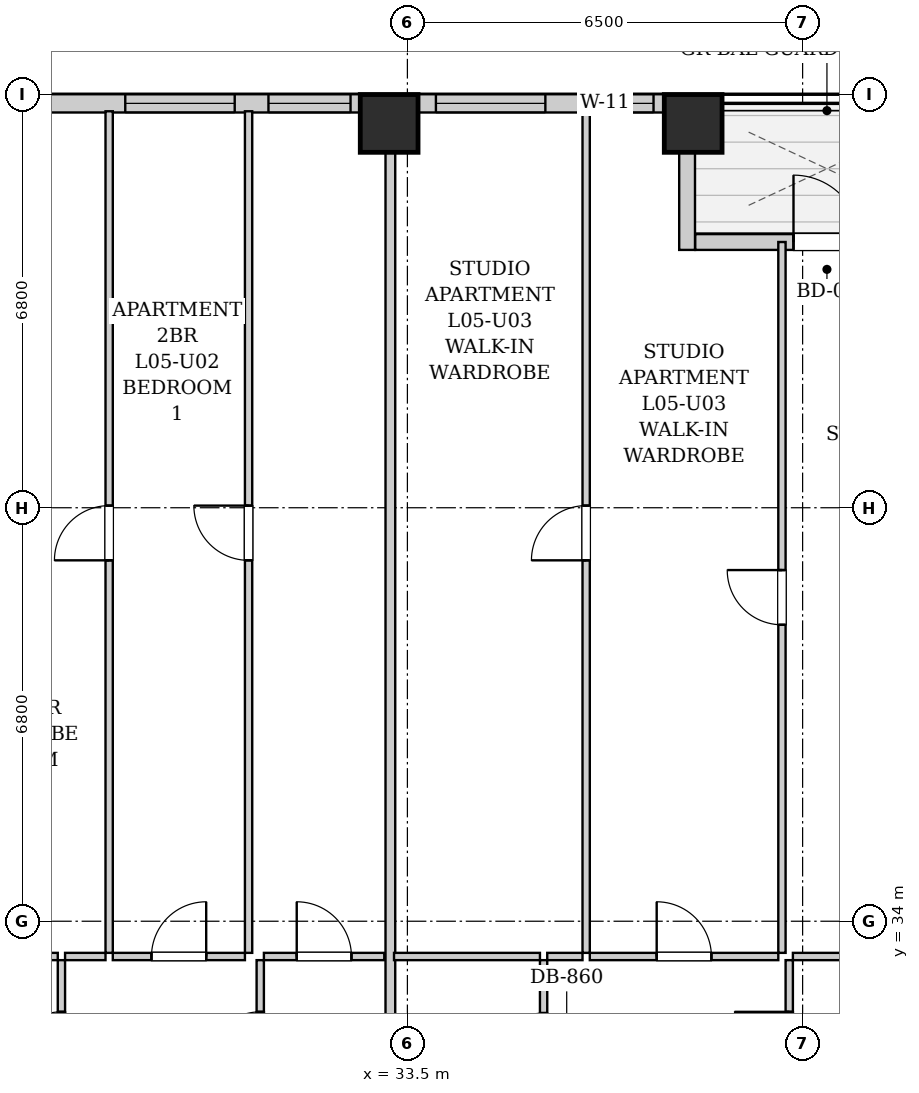
"""IFC4 building model, lengths in metres.
Left out: names, types, materials, properties, quantities, classifications, styles, units other than length and angle.
Written with IfcOpenShell. Run it as: python <this file> out.ifc"""

import sys

from ifc_helpers import new_model, si_unit, direction, frame, frame_2d, origin, origin_2d, place, context, subcontext, project, spatial, rectangle, extrude, element, fill, save


model = new_model("IFC4")
c1 = context("Model", 3, precision=1e-05, world=origin(), true_north=direction((0.0, 1.0)))
c2 = subcontext(c1, "Body", "Model", "MODEL_VIEW")
j1 = project(units=[si_unit("LENGTHUNIT", "METRE"), si_unit("PLANEANGLEUNIT", "RADIAN")], contexts=[c1])
p1 = place(None, origin())
s1 = spatial("IfcSite", under=j1, at=p1, CompositionType="ELEMENT")
p2 = place(p1, origin())
s2 = spatial("IfcBuilding", under=s1, at=p2, CompositionType="ELEMENT")
p3 = place(p2, frame((0.0, 0.0, 25.8)))
s3 = spatial("IfcBuildingStorey", under=s2, at=p3, CompositionType="ELEMENT", Elevation=25.8)
for number, where, z_axis, x_axis in (
    (1, (33.2, 47.12, 0.0), (0.0, 0.0, 1.0), (1.0, 0.0, 0.0)),
    (2, (38.2, 47.12, 0.0), (0.0, 0.0, 1.0), (1.0, 0.0, 0.0)),
):
    element("IfcColumn", number, at=place(p3, frame(where, z_axis=z_axis, x_axis=x_axis)), inside=s3, PredefinedType="COLUMN", context=c2, shape_type="SweptSolid", body=[
        extrude(rectangle(XDim=0.95, YDim=0.95, at=origin_2d()), origin(), (0.0, 0.0, 1.0), 3.2),
    ])
p4 = place(p3, frame((10.0, 47.45, 0.0), z_axis=(0.0, 0.0, 1.0), x_axis=(1.0, 0.0, 0.0)))
e3 = element("IfcWall", 3, at=p4, inside=s3, PredefinedType="SOLIDWALL", context=c2, shape_type="SweptSolid", body=[
    extrude(rectangle(XDim=28.1, YDim=0.3, at=frame_2d((14.05, 0.0))), origin(), (0.0, 0.0, 1.0), 1.975),
])
p5 = place(p4, frame((5.712, 0.0, 0.55)))
e4 = element("IfcOpeningElement", 4, at=p5, cuts=e3, PredefinedType="OPENING", context=c2, shape_type="SweptSolid", body=[
    extrude(rectangle(XDim=1.35, YDim=1.2, at=frame_2d((0.675, 0.6))), frame((0.0, 0.16, 0.0), z_axis=(0.0, -1.0, 0.0), x_axis=(1.0, 0.0, 0.0)), (0.0, 0.0, 1.0), 0.32),
])
p6 = place(p4, frame((8.792, 0.0, 0.55)))
e5 = element("IfcOpeningElement", 5, at=p6, cuts=e3, PredefinedType="OPENING", context=c2, shape_type="SweptSolid", body=[
    extrude(rectangle(XDim=1.8, YDim=1.2, at=frame_2d((0.9, 0.6))), frame((0.0, 0.16, 0.0), z_axis=(0.0, -1.0, 0.0), x_axis=(1.0, 0.0, 0.0)), (0.0, 0.0, 1.0), 0.32),
])
p7 = place(p4, frame((18.86, 0.0, 0.55)))
e6 = element("IfcOpeningElement", 6, at=p7, cuts=e3, PredefinedType="OPENING", context=c2, shape_type="SweptSolid", body=[
    extrude(rectangle(XDim=1.8, YDim=1.2, at=frame_2d((0.9, 0.6))), frame((0.0, 0.16, 0.0), z_axis=(0.0, -1.0, 0.0), x_axis=(1.0, 0.0, 0.0)), (0.0, 0.0, 1.0), 0.32),
])
p8 = place(p4, frame((21.215, 0.0, 0.55)))
e7 = element("IfcOpeningElement", 7, at=p8, cuts=e3, PredefinedType="OPENING", context=c2, shape_type="SweptSolid", body=[
    extrude(rectangle(XDim=1.35, YDim=1.2, at=frame_2d((0.675, 0.6))), frame((0.0, 0.16, 0.0), z_axis=(0.0, -1.0, 0.0), x_axis=(1.0, 0.0, 0.0)), (0.0, 0.0, 1.0), 0.32),
])
p9 = place(p4, frame((23.969, 0.0, 0.55)))
e8 = element("IfcOpeningElement", 8, at=p9, cuts=e3, PredefinedType="OPENING", context=c2, shape_type="SweptSolid", body=[
    extrude(rectangle(XDim=1.8, YDim=1.2, at=frame_2d((0.9, 0.6))), frame((0.0, 0.16, 0.0), z_axis=(0.0, -1.0, 0.0), x_axis=(1.0, 0.0, 0.0)), (0.0, 0.0, 1.0), 0.32),
])
p10 = place(p4, frame((26.698, 0.0, 0.55)))
e9 = element("IfcOpeningElement", 9, at=p10, cuts=e3, PredefinedType="OPENING", context=c2, shape_type="SweptSolid", body=[
    extrude(rectangle(XDim=0.85, YDim=1.2, at=frame_2d((0.425, 0.6))), frame((0.0, 0.16, 0.0), z_axis=(0.0, -1.0, 0.0), x_axis=(1.0, 0.0, 0.0)), (0.0, 0.0, 1.0), 0.32),
])
p11 = place(p3, frame((38.1, 47.44, 0.0), z_axis=(0.0, 0.0, 1.0), x_axis=(0.0, -1.0, 0.0)))
e10 = element("IfcWall", 10, at=p11, inside=s3, PredefinedType="SOLIDWALL", context=c2, shape_type="SweptSolid", body=[
    extrude(rectangle(XDim=2.4, YDim=0.26, at=frame_2d((1.2, 0.0))), origin(), (0.0, 0.0, 1.0), 2.94),
])
p12 = place(p3, frame((38.234, 45.17, 0.0), z_axis=(0.0, 0.0, 1.0), x_axis=(1.0, 0.0, 0.0)))
e11 = element("IfcWall", 11, at=p12, inside=s3, PredefinedType="SOLIDWALL", context=c2, shape_type="SweptSolid", body=[
    extrude(rectangle(XDim=4.332, YDim=0.26, at=frame_2d((2.166, 0.0))), origin(), (0.0, 0.0, 1.0), 2.94),
])
p13 = place(p12, frame((1.616, 0.0, 0.0)))
e12 = element("IfcOpeningElement", 12, at=p13, cuts=e11, PredefinedType="OPENING", context=c2, shape_type="SweptSolid", body=[
    extrude(rectangle(XDim=1.1, YDim=2.0, at=frame_2d((0.55, 1.0))), frame((0.0, 0.14, 0.0), z_axis=(0.0, -1.0, 0.0), x_axis=(1.0, 0.0, 0.0)), (0.0, 0.0, 1.0), 0.28),
])
p14 = place(p3, frame((27.81, 30.76, 0.0), z_axis=(0.0, 0.0, 1.0), x_axis=(0.0, 1.0, 0.0)))
e13 = element("IfcWall", 13, at=p14, inside=s3, PredefinedType="PARTITIONING", context=c2, shape_type="SweptSolid", body=[
    extrude(rectangle(XDim=2.6, YDim=0.12, at=frame_2d((1.3, 0.0))), origin(), (0.0, 0.0, 1.0), 2.94),
])
p15 = place(p14, frame((0.85, 0.0, 0.0)))
e14 = element("IfcOpeningElement", 14, at=p15, cuts=e13, PredefinedType="OPENING", context=c2, shape_type="SweptSolid", body=[
    extrude(rectangle(XDim=0.9, YDim=2.05, at=frame_2d((0.45, 1.025))), frame((0.0, 0.07, 0.0), z_axis=(0.0, -1.0, 0.0), x_axis=(1.0, 0.0, 0.0)), (0.0, 0.0, 1.0), 0.14),
])
p16 = place(p3, frame((24.204, 33.42, 0.0), z_axis=(0.0, 0.0, 1.0), x_axis=(1.0, 0.0, 0.0)))
e15 = element("IfcWall", 15, at=p16, inside=s3, PredefinedType="PARTITIONING", context=c2, shape_type="SweptSolid", body=[
    extrude(rectangle(XDim=3.546, YDim=0.12, at=frame_2d((1.773, 0.0))), origin(), (0.0, 0.0, 1.0), 2.94),
])
p17 = place(p16, frame((1.323, 0.0, 0.0)))
e16 = element("IfcOpeningElement", 16, at=p17, cuts=e15, PredefinedType="OPENING", context=c2, shape_type="SweptSolid", body=[
    extrude(rectangle(XDim=0.9, YDim=2.05, at=frame_2d((0.45, 1.025))), frame((0.0, 0.07, 0.0), z_axis=(0.0, -1.0, 0.0), x_axis=(1.0, 0.0, 0.0)), (0.0, 0.0, 1.0), 0.14),
])
p18 = place(p3, frame((31.08, 30.76, 0.0), z_axis=(0.0, 0.0, 1.0), x_axis=(0.0, 1.0, 0.0)))
e17 = element("IfcWall", 17, at=p18, inside=s3, PredefinedType="PARTITIONING", context=c2, shape_type="SweptSolid", body=[
    extrude(rectangle(XDim=2.6, YDim=0.12, at=frame_2d((1.3, 0.0))), origin(), (0.0, 0.0, 1.0), 2.94),
])
p19 = place(p18, frame((0.85, 0.0, 0.0)))
e18 = element("IfcOpeningElement", 18, at=p19, cuts=e17, PredefinedType="OPENING", context=c2, shape_type="SweptSolid", body=[
    extrude(rectangle(XDim=0.9, YDim=2.05, at=frame_2d((0.45, 1.025))), frame((0.0, 0.07, 0.0), z_axis=(0.0, -1.0, 0.0), x_axis=(1.0, 0.0, 0.0)), (0.0, 0.0, 1.0), 0.14),
])
p20 = place(p3, frame((27.87, 33.42, 0.0), z_axis=(0.0, 0.0, 1.0), x_axis=(1.0, 0.0, 0.0)))
e19 = element("IfcWall", 19, at=p20, inside=s3, PredefinedType="PARTITIONING", context=c2, shape_type="SweptSolid", body=[
    extrude(rectangle(XDim=0.665, YDim=0.12, at=frame_2d((0.333, 0.0))), origin(), (0.0, 0.0, 1.0), 2.94),
])
p21 = place(p3, frame((28.655, 33.42, 0.0), z_axis=(0.0, 0.0, 1.0), x_axis=(1.0, 0.0, 0.0)))
e20 = element("IfcWall", 20, at=p21, inside=s3, PredefinedType="PARTITIONING", context=c2, shape_type="SweptSolid", body=[
    extrude(rectangle(XDim=2.173, YDim=0.12, at=frame_2d((1.086, 0.0))), origin(), (0.0, 0.0, 1.0), 2.94),
])
p22 = place(p21, frame((0.636, 0.0, 0.0)))
e21 = element("IfcOpeningElement", 21, at=p22, cuts=e20, PredefinedType="OPENING", context=c2, shape_type="SweptSolid", body=[
    extrude(rectangle(XDim=0.9, YDim=2.05, at=frame_2d((0.45, 1.025))), frame((0.0, 0.07, 0.0), z_axis=(0.0, -1.0, 0.0), x_axis=(1.0, 0.0, 0.0)), (0.0, 0.0, 1.0), 0.14),
])
p23 = place(p3, frame((31.14, 33.42, 0.0), z_axis=(0.0, 0.0, 1.0), x_axis=(1.0, 0.0, 0.0)))
e22 = element("IfcWall", 22, at=p23, inside=s3, PredefinedType="PARTITIONING", context=c2, shape_type="SweptSolid", body=[
    extrude(rectangle(XDim=1.98, YDim=0.12, at=frame_2d((0.99, 0.0))), origin(), (0.0, 0.0, 1.0), 2.94),
])
p24 = place(p23, frame((0.54, 0.0, 0.0)))
e23 = element("IfcOpeningElement", 23, at=p24, cuts=e22, PredefinedType="OPENING", context=c2, shape_type="SweptSolid", body=[
    extrude(rectangle(XDim=0.9, YDim=2.05, at=frame_2d((0.45, 1.025))), frame((0.0, 0.07, 0.0), z_axis=(0.0, -1.0, 0.0), x_axis=(1.0, 0.0, 0.0)), (0.0, 0.0, 1.0), 0.14),
])
p25 = place(p3, frame((28.595, 33.48, 0.0), z_axis=(0.0, 0.0, 1.0), x_axis=(0.0, 1.0, 0.0)))
e24 = element("IfcWall", 24, at=p25, inside=s3, PredefinedType="PARTITIONING", context=c2, shape_type="SweptSolid", body=[
    extrude(rectangle(XDim=13.84, YDim=0.12, at=frame_2d((6.92, 0.0))), origin(), (0.0, 0.0, 1.0), 2.94),
])
p26 = place(p25, frame((6.455, 0.0, 0.0)))
e25 = element("IfcOpeningElement", 25, at=p26, cuts=e24, PredefinedType="OPENING", context=c2, shape_type="SweptSolid", body=[
    extrude(rectangle(XDim=0.9, YDim=2.05, at=frame_2d((0.45, 1.025))), frame((0.0, 0.07, 0.0), z_axis=(0.0, -1.0, 0.0), x_axis=(1.0, 0.0, 0.0)), (0.0, 0.0, 1.0), 0.14),
])
p27 = place(p3, frame((30.888, 33.48, 0.0), z_axis=(0.0, 0.0, 1.0), x_axis=(0.0, 1.0, 0.0)))
e26 = element("IfcWall", 26, at=p27, inside=s3, PredefinedType="PARTITIONING", context=c2, shape_type="SweptSolid", body=[
    extrude(rectangle(XDim=13.84, YDim=0.12, at=frame_2d((6.92, 0.0))), origin(), (0.0, 0.0, 1.0), 2.94),
])
p28 = place(p27, frame((6.455, 0.0, 0.0)))
e27 = element("IfcOpeningElement", 27, at=p28, cuts=e26, PredefinedType="OPENING", context=c2, shape_type="SweptSolid", body=[
    extrude(rectangle(XDim=0.9, YDim=2.05, at=frame_2d((0.45, 1.025))), frame((0.0, 0.07, 0.0), z_axis=(0.0, -1.0, 0.0), x_axis=(1.0, 0.0, 0.0)), (0.0, 0.0, 1.0), 0.14),
])
p29 = place(p3, frame((33.22, 30.76, 0.0), z_axis=(0.0, 0.0, 1.0), x_axis=(0.0, 1.0, 0.0)))
e28 = element("IfcWall", 28, at=p29, inside=s3, PredefinedType="PARTITIONING", context=c2, shape_type="SweptSolid", body=[
    extrude(rectangle(XDim=16.56, YDim=0.16, at=frame_2d((8.28, 0.0))), origin(), (0.0, 0.0, 1.0), 2.155),
])
p30 = place(p3, frame((35.74, 30.76, 0.0), z_axis=(0.0, 0.0, 1.0), x_axis=(0.0, 1.0, 0.0)))
e29 = element("IfcWall", 29, at=p30, inside=s3, PredefinedType="PARTITIONING", context=c2, shape_type="SweptSolid", body=[
    extrude(rectangle(XDim=2.6, YDim=0.12, at=frame_2d((1.3, 0.0))), origin(), (0.0, 0.0, 1.0), 2.94),
])
p31 = place(p30, frame((0.87, 0.0, 0.0)))
e30 = element("IfcOpeningElement", 30, at=p31, cuts=e29, PredefinedType="OPENING", context=c2, shape_type="SweptSolid", body=[
    extrude(rectangle(XDim=0.86, YDim=2.05, at=frame_2d((0.43, 1.025))), frame((0.0, 0.07, 0.0), z_axis=(0.0, -1.0, 0.0), x_axis=(1.0, 0.0, 0.0)), (0.0, 0.0, 1.0), 0.14),
])
p32 = place(p3, frame((33.28, 33.42, 0.0), z_axis=(0.0, 0.0, 1.0), x_axis=(1.0, 0.0, 0.0)))
e31 = element("IfcWall", 31, at=p32, inside=s3, PredefinedType="PARTITIONING", context=c2, shape_type="SweptSolid", body=[
    extrude(rectangle(XDim=2.4, YDim=0.12, at=frame_2d((1.2, 0.0))), origin(), (0.0, 0.0, 1.0), 2.94),
])
p33 = place(p3, frame((39.78, 30.76, 0.0), z_axis=(0.0, 0.0, 1.0), x_axis=(0.0, 1.0, 0.0)))
e32 = element("IfcWall", 32, at=p33, inside=s3, PredefinedType="PARTITIONING", context=c2, shape_type="SweptSolid", body=[
    extrude(rectangle(XDim=2.6, YDim=0.12, at=frame_2d((1.3, 0.0))), origin(), (0.0, 0.0, 1.0), 2.94),
])
p34 = place(p33, frame((0.85, 0.0, 0.0)))
e33 = element("IfcOpeningElement", 33, at=p34, cuts=e32, PredefinedType="OPENING", context=c2, shape_type="SweptSolid", body=[
    extrude(rectangle(XDim=0.9, YDim=2.05, at=frame_2d((0.45, 1.025))), frame((0.0, 0.07, 0.0), z_axis=(0.0, -1.0, 0.0), x_axis=(1.0, 0.0, 0.0)), (0.0, 0.0, 1.0), 0.14),
])
p35 = place(p3, frame((35.8, 33.42, 0.0), z_axis=(0.0, 0.0, 1.0), x_axis=(1.0, 0.0, 0.0)))
e34 = element("IfcWall", 34, at=p35, inside=s3, PredefinedType="PARTITIONING", context=c2, shape_type="SweptSolid", body=[
    extrude(rectangle(XDim=0.58, YDim=0.12, at=frame_2d((0.29, 0.0))), origin(), (0.0, 0.0, 1.0), 2.94),
])
p36 = place(p3, frame((36.5, 33.42, 0.0), z_axis=(0.0, 0.0, 1.0), x_axis=(1.0, 0.0, 0.0)))
e35 = element("IfcWall", 35, at=p36, inside=s3, PredefinedType="PARTITIONING", context=c2, shape_type="SweptSolid", body=[
    extrude(rectangle(XDim=3.1, YDim=0.12, at=frame_2d((1.55, 0.0))), origin(), (0.0, 0.0, 1.0), 2.94),
])
p37 = place(p36, frame((1.1, 0.0, 0.0)))
e36 = element("IfcOpeningElement", 36, at=p37, cuts=e35, PredefinedType="OPENING", context=c2, shape_type="SweptSolid", body=[
    extrude(rectangle(XDim=0.9, YDim=2.05, at=frame_2d((0.45, 1.025))), frame((0.0, 0.07, 0.0), z_axis=(0.0, -1.0, 0.0), x_axis=(1.0, 0.0, 0.0)), (0.0, 0.0, 1.0), 0.14),
])
p38 = place(p3, frame((39.84, 33.42, 0.0), z_axis=(0.0, 0.0, 1.0), x_axis=(1.0, 0.0, 0.0)))
e37 = element("IfcWall", 37, at=p38, inside=s3, PredefinedType="PARTITIONING", context=c2, shape_type="SweptSolid", body=[
    extrude(rectangle(XDim=4.08, YDim=0.12, at=frame_2d((2.04, 0.0))), origin(), (0.0, 0.0, 1.0), 2.94),
])
p39 = place(p38, frame((1.59, 0.0, 0.0)))
e38 = element("IfcOpeningElement", 38, at=p39, cuts=e37, PredefinedType="OPENING", context=c2, shape_type="SweptSolid", body=[
    extrude(rectangle(XDim=0.9, YDim=2.05, at=frame_2d((0.45, 1.025))), frame((0.0, 0.07, 0.0), z_axis=(0.0, -1.0, 0.0), x_axis=(1.0, 0.0, 0.0)), (0.0, 0.0, 1.0), 0.14),
])
p40 = place(p3, frame((36.44, 33.48, 0.0), z_axis=(0.0, 0.0, 1.0), x_axis=(0.0, 1.0, 0.0)))
e39 = element("IfcWall", 39, at=p40, inside=s3, PredefinedType="PARTITIONING", context=c2, shape_type="SweptSolid", body=[
    extrude(rectangle(XDim=13.84, YDim=0.12, at=frame_2d((6.92, 0.0))), origin(), (0.0, 0.0, 1.0), 2.94),
])
p41 = place(p40, frame((6.455, 0.0, 0.0)))
e40 = element("IfcOpeningElement", 40, at=p41, cuts=e39, PredefinedType="OPENING", context=c2, shape_type="SweptSolid", body=[
    extrude(rectangle(XDim=0.9, YDim=2.05, at=frame_2d((0.45, 1.025))), frame((0.0, 0.07, 0.0), z_axis=(0.0, -1.0, 0.0), x_axis=(1.0, 0.0, 0.0)), (0.0, 0.0, 1.0), 0.14),
])
p42 = place(p3, frame((39.66, 33.48, 0.0), z_axis=(0.0, 0.0, 1.0), x_axis=(0.0, 1.0, 0.0)))
e41 = element("IfcWall", 41, at=p42, inside=s3, PredefinedType="PARTITIONING", context=c2, shape_type="SweptSolid", body=[
    extrude(rectangle(XDim=11.69, YDim=0.12, at=frame_2d((5.845, 0.0))), origin(), (0.0, 0.0, 1.0), 2.94),
])
p43 = place(p42, frame((5.395, 0.0, 0.0)))
e42 = element("IfcOpeningElement", 42, at=p43, cuts=e41, PredefinedType="OPENING", context=c2, shape_type="SweptSolid", body=[
    extrude(rectangle(XDim=0.9, YDim=2.05, at=frame_2d((0.45, 1.025))), frame((0.0, 0.07, 0.0), z_axis=(0.0, -1.0, 0.0), x_axis=(1.0, 0.0, 0.0)), (0.0, 0.0, 1.0), 0.14),
])
p44 = place(p15, origin())
e43 = element("IfcDoor", 43, at=p44, inside=s3, OperationType="SINGLE_SWING_LEFT", PredefinedType="DOOR", context=c2, shape_type="SweptSolid", body=[
    extrude(rectangle(XDim=0.9, YDim=2.05, at=frame_2d((0.45, 1.025))), frame((0.0, 0.025, 0.0), z_axis=(0.0, -1.0, 0.0), x_axis=(1.0, 0.0, 0.0)), (0.0, 0.0, 1.0), 0.05),
])
fill(e14, e43)
p45 = place(p19, origin())
e44 = element("IfcDoor", 44, at=p45, inside=s3, OperationType="SINGLE_SWING_LEFT", PredefinedType="DOOR", context=c2, shape_type="SweptSolid", body=[
    extrude(rectangle(XDim=0.9, YDim=2.05, at=frame_2d((0.45, 1.025))), frame((0.0, 0.025, 0.0), z_axis=(0.0, -1.0, 0.0), x_axis=(1.0, 0.0, 0.0)), (0.0, 0.0, 1.0), 0.05),
])
fill(e18, e44)
p46 = place(p22, origin())
e45 = element("IfcDoor", 45, at=p46, inside=s3, OperationType="SINGLE_SWING_RIGHT", PredefinedType="DOOR", context=c2, shape_type="SweptSolid", body=[
    extrude(rectangle(XDim=0.9, YDim=2.05, at=frame_2d((0.45, 1.025))), frame((0.0, 0.025, 0.0), z_axis=(0.0, -1.0, 0.0), x_axis=(1.0, 0.0, 0.0)), (0.0, 0.0, 1.0), 0.05),
])
fill(e21, e45)
p47 = place(p24, origin())
e46 = element("IfcDoor", 46, at=p47, inside=s3, OperationType="SINGLE_SWING_LEFT", PredefinedType="DOOR", context=c2, shape_type="SweptSolid", body=[
    extrude(rectangle(XDim=0.9, YDim=2.05, at=frame_2d((0.45, 1.025))), frame((0.0, 0.025, 0.0), z_axis=(0.0, -1.0, 0.0), x_axis=(1.0, 0.0, 0.0)), (0.0, 0.0, 1.0), 0.05),
])
fill(e23, e46)
p48 = place(p26, origin())
e47 = element("IfcDoor", 47, at=p48, inside=s3, OperationType="SINGLE_SWING_LEFT", PredefinedType="DOOR", context=c2, shape_type="SweptSolid", body=[
    extrude(rectangle(XDim=0.9, YDim=2.05, at=frame_2d((0.45, 1.025))), frame((0.0, 0.025, 0.0), z_axis=(0.0, -1.0, 0.0), x_axis=(1.0, 0.0, 0.0)), (0.0, 0.0, 1.0), 0.05),
])
fill(e25, e47)
p49 = place(p28, origin())
e48 = element("IfcDoor", 48, at=p49, inside=s3, OperationType="SINGLE_SWING_RIGHT", PredefinedType="DOOR", context=c2, shape_type="SweptSolid", body=[
    extrude(rectangle(XDim=0.9, YDim=2.05, at=frame_2d((0.45, 1.025))), frame((0.0, 0.025, 0.0), z_axis=(0.0, -1.0, 0.0), x_axis=(1.0, 0.0, 0.0)), (0.0, 0.0, 1.0), 0.05),
])
fill(e27, e48)
p50 = place(p31, origin())
e49 = element("IfcDoor", 49, at=p50, inside=s3, OperationType="SINGLE_SWING_LEFT", PredefinedType="DOOR", context=c2, shape_type="SweptSolid", body=[
    extrude(rectangle(XDim=0.86, YDim=2.05, at=frame_2d((0.43, 1.025))), frame((0.0, 0.025, 0.0), z_axis=(0.0, -1.0, 0.0), x_axis=(1.0, 0.0, 0.0)), (0.0, 0.0, 1.0), 0.05),
])
fill(e30, e49)
p51 = place(p34, origin())
e50 = element("IfcDoor", 50, at=p51, inside=s3, OperationType="SINGLE_SWING_RIGHT", PredefinedType="DOOR", context=c2, shape_type="SweptSolid", body=[
    extrude(rectangle(XDim=0.9, YDim=2.05, at=frame_2d((0.45, 1.025))), frame((0.0, 0.025, 0.0), z_axis=(0.0, -1.0, 0.0), x_axis=(1.0, 0.0, 0.0)), (0.0, 0.0, 1.0), 0.05),
])
fill(e33, e50)
p52 = place(p37, origin())
e51 = element("IfcDoor", 51, at=p52, inside=s3, OperationType="SINGLE_SWING_LEFT", PredefinedType="DOOR", context=c2, shape_type="SweptSolid", body=[
    extrude(rectangle(XDim=0.9, YDim=2.05, at=frame_2d((0.45, 1.025))), frame((0.0, 0.025, 0.0), z_axis=(0.0, -1.0, 0.0), x_axis=(1.0, 0.0, 0.0)), (0.0, 0.0, 1.0), 0.05),
])
fill(e36, e51)
p53 = place(p41, origin())
e52 = element("IfcDoor", 52, at=p53, inside=s3, OperationType="SINGLE_SWING_LEFT", PredefinedType="DOOR", context=c2, shape_type="SweptSolid", body=[
    extrude(rectangle(XDim=0.9, YDim=2.05, at=frame_2d((0.45, 1.025))), frame((0.0, 0.025, 0.0), z_axis=(0.0, -1.0, 0.0), x_axis=(1.0, 0.0, 0.0)), (0.0, 0.0, 1.0), 0.05),
])
fill(e40, e52)
p54 = place(p43, origin())
e53 = element("IfcDoor", 53, at=p54, inside=s3, OperationType="SINGLE_SWING_RIGHT", PredefinedType="DOOR", context=c2, shape_type="SweptSolid", body=[
    extrude(rectangle(XDim=0.9, YDim=2.05, at=frame_2d((0.45, 1.025))), frame((0.0, 0.025, 0.0), z_axis=(0.0, -1.0, 0.0), x_axis=(1.0, 0.0, 0.0)), (0.0, 0.0, 1.0), 0.05),
])
fill(e42, e53)
p55 = place(p13, origin())
e54 = element("IfcDoor", 54, at=p55, inside=s3, OperationType="SINGLE_SWING_LEFT", PredefinedType="DOOR", context=c2, shape_type="SweptSolid", body=[
    extrude(rectangle(XDim=1.1, YDim=2.0, at=frame_2d((0.55, 1.0))), frame((0.0, 0.025, 0.0), z_axis=(0.0, -1.0, 0.0), x_axis=(1.0, 0.0, 0.0)), (0.0, 0.0, 1.0), 0.05),
])
fill(e12, e54)
p56 = place(p7, origin())
e55 = element("IfcWindow", 55, at=p56, inside=s3, PartitioningType="DOUBLE_PANEL_VERTICAL", PredefinedType="WINDOW", context=c2, shape_type="SweptSolid", body=[
    extrude(rectangle(XDim=1.8, YDim=1.2, at=frame_2d((0.9, 0.6))), frame((0.0, 0.03, 0.0), z_axis=(0.0, -1.0, 0.0), x_axis=(1.0, 0.0, 0.0)), (0.0, 0.0, 1.0), 0.06),
])
fill(e6, e55)
p57 = place(p8, origin())
e56 = element("IfcWindow", 56, at=p57, inside=s3, PartitioningType="SINGLE_PANEL", PredefinedType="WINDOW", context=c2, shape_type="SweptSolid", body=[
    extrude(rectangle(XDim=1.35, YDim=1.2, at=frame_2d((0.675, 0.6))), frame((0.0, 0.03, 0.0), z_axis=(0.0, -1.0, 0.0), x_axis=(1.0, 0.0, 0.0)), (0.0, 0.0, 1.0), 0.06),
])
fill(e7, e56)
p58 = place(p9, origin())
e57 = element("IfcWindow", 57, at=p58, inside=s3, PartitioningType="DOUBLE_PANEL_VERTICAL", PredefinedType="WINDOW", context=c2, shape_type="SweptSolid", body=[
    extrude(rectangle(XDim=1.8, YDim=1.2, at=frame_2d((0.9, 0.6))), frame((0.0, 0.03, 0.0), z_axis=(0.0, -1.0, 0.0), x_axis=(1.0, 0.0, 0.0)), (0.0, 0.0, 1.0), 0.06),
])
fill(e8, e57)
p59 = place(p10, origin())
e58 = element("IfcWindow", 58, at=p59, inside=s3, PartitioningType="SINGLE_PANEL", PredefinedType="WINDOW", context=c2, shape_type="SweptSolid", body=[
    extrude(rectangle(XDim=0.85, YDim=1.2, at=frame_2d((0.425, 0.6))), frame((0.0, 0.03, 0.0), z_axis=(0.0, -1.0, 0.0), x_axis=(1.0, 0.0, 0.0)), (0.0, 0.0, 1.0), 0.06),
])
fill(e9, e58)
save(model, sys.argv[1])
